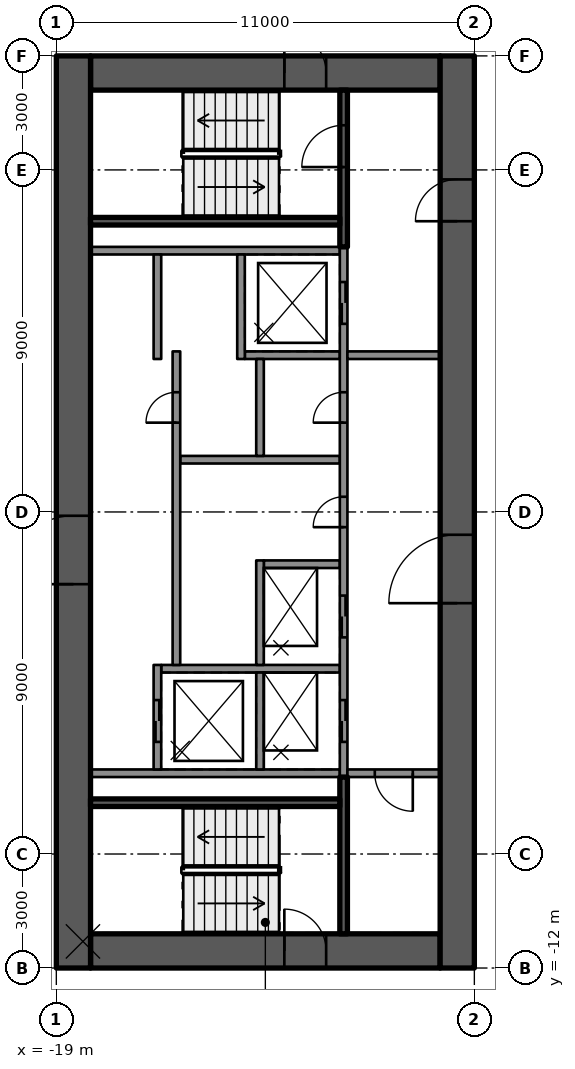
"""IFC4 building model, lengths in metres.
Left out: names, types, materials, properties, quantities, classifications, styles, units other than length and angle.
Written with IfcOpenShell. Run it as: python <this file> out.ifc"""

import sys

from ifc_helpers import new_model, si_unit, direction, frame, frame_2d, origin, place, context, subcontext, project, spatial, rectangle, extrude, element, fill, save


model = new_model("IFC4")
c1 = context("Model", 3, precision=1e-05, world=origin(), true_north=direction((0.0, 1.0)))
c2 = subcontext(c1, "Body", "Model", "MODEL_VIEW")
j1 = project(units=[si_unit("LENGTHUNIT", "METRE"), si_unit("PLANEANGLEUNIT", "RADIAN")], contexts=[c1])
p1 = place(None, origin())
s1 = spatial("IfcSite", under=j1, at=p1, CompositionType="ELEMENT")
p2 = place(p1, origin())
s2 = spatial("IfcBuilding", under=s1, at=p2, CompositionType="ELEMENT")
p3 = place(p2, frame((0.0, 0.0, 278.9)))
s3 = spatial("IfcBuildingStorey", under=s2, at=p3, CompositionType="ELEMENT", Elevation=278.9)
p4 = place(p3, frame((-18.1, 11.55, 0.0), z_axis=(0.0, 0.0, 1.0), x_axis=(1.0, 0.0, 0.0)))
e1 = element("IfcWall", 1, at=p4, inside=s3, PredefinedType="SHEAR", context=c2, shape_type="SweptSolid", body=[
    extrude(rectangle(XDim=9.2, YDim=0.9, at=frame_2d((4.6, 0.0))), origin(), (0.0, 0.0, 1.0), 3.5),
])
p5 = place(p4, frame((5.1, 0.0, 0.0)))
e2 = element("IfcOpeningElement", 2, at=p5, cuts=e1, PredefinedType="OPENING", context=c2, shape_type="SweptSolid", body=[
    extrude(rectangle(XDim=1.1, YDim=2.1, at=frame_2d((0.55, 1.05))), frame((0.0, 0.46, 0.0), z_axis=(0.0, -1.0, 0.0), x_axis=(1.0, 0.0, 0.0)), (0.0, 0.0, 1.0), 0.92),
])
p6 = place(p3, frame((-18.1, -11.55, 0.0), z_axis=(0.0, 0.0, 1.0), x_axis=(1.0, 0.0, 0.0)))
e3 = element("IfcWall", 3, at=p6, inside=s3, PredefinedType="SHEAR", context=c2, shape_type="SweptSolid", body=[
    extrude(rectangle(XDim=9.2, YDim=0.9, at=frame_2d((4.6, 0.0))), origin(), (0.0, 0.0, 1.0), 3.5),
])
p7 = place(p6, frame((5.1, 0.0, 0.0)))
e4 = element("IfcOpeningElement", 4, at=p7, cuts=e3, PredefinedType="OPENING", context=c2, shape_type="SweptSolid", body=[
    extrude(rectangle(XDim=1.1, YDim=2.1, at=frame_2d((0.55, 1.05))), frame((0.0, 0.46, 0.0), z_axis=(0.0, -1.0, 0.0), x_axis=(1.0, 0.0, 0.0)), (0.0, 0.0, 1.0), 0.92),
])
p8 = place(p3, frame((-18.55, -12.0, 0.0), z_axis=(0.0, 0.0, 1.0), x_axis=(0.0, 1.0, 0.0)))
e5 = element("IfcWall", 5, at=p8, inside=s3, PredefinedType="SHEAR", context=c2, shape_type="SweptSolid", body=[
    extrude(rectangle(XDim=24.0, YDim=0.9, at=frame_2d((12.0, 0.0))), origin(), (0.0, 0.0, 1.0), 3.5),
])
p9 = place(p8, frame((10.1, 0.0, 0.0)))
e6 = element("IfcOpeningElement", 6, at=p9, cuts=e5, PredefinedType="OPENING", context=c2, shape_type="SweptSolid", body=[
    extrude(rectangle(XDim=1.8, YDim=2.1, at=frame_2d((0.9, 1.05))), frame((0.0, 0.46, 0.0), z_axis=(0.0, -1.0, 0.0), x_axis=(1.0, 0.0, 0.0)), (0.0, 0.0, 1.0), 0.92),
])
p10 = place(p3, frame((-8.45, -12.0, 0.0), z_axis=(0.0, 0.0, 1.0), x_axis=(0.0, 1.0, 0.0)))
e7 = element("IfcWall", 7, at=p10, inside=s3, PredefinedType="SHEAR", context=c2, shape_type="SweptSolid", body=[
    extrude(rectangle(XDim=24.0, YDim=0.9, at=frame_2d((12.0, 0.0))), origin(), (0.0, 0.0, 1.0), 3.5),
])
p11 = place(p10, frame((9.6, 0.0, 0.0)))
e8 = element("IfcOpeningElement", 8, at=p11, cuts=e7, PredefinedType="OPENING", context=c2, shape_type="SweptSolid", body=[
    extrude(rectangle(XDim=1.8, YDim=2.1, at=frame_2d((0.9, 1.05))), frame((0.0, 0.46, 0.0), z_axis=(0.0, -1.0, 0.0), x_axis=(1.0, 0.0, 0.0)), (0.0, 0.0, 1.0), 0.92),
])
p12 = place(p10, frame((19.65, 0.0, 0.0)))
e9 = element("IfcOpeningElement", 9, at=p12, cuts=e7, PredefinedType="OPENING", context=c2, shape_type="SweptSolid", body=[
    extrude(rectangle(XDim=1.1, YDim=2.1, at=frame_2d((0.55, 1.05))), frame((0.0, 0.46, 0.0), z_axis=(0.0, -1.0, 0.0), x_axis=(1.0, 0.0, 0.0)), (0.0, 0.0, 1.0), 0.92),
])
for number, where, z_axis, x_axis in (
    (10, (-11.54, 6.875, 0.0), (0.0, 0.0, 1.0), (-1.0, 0.0, 0.0)),
    (11, (-11.54, -6.875, 0.0), (0.0, 0.0, 1.0), (-1.0, 0.0, 0.0)),
):
    element("IfcWall", number, at=place(p3, frame(where, z_axis=z_axis, x_axis=x_axis)), inside=s3, PredefinedType="SOLIDWALL", context=c2, shape_type="SweptSolid", body=[
        extrude(rectangle(XDim=6.56, YDim=0.2, at=frame_2d((3.28, 0.0))), origin(), (0.0, 0.0, 1.0), 3.09),
    ])
p13 = place(p3, frame((-11.54, -4.125, 0.0), z_axis=(0.0, 0.0, 1.0), x_axis=(-1.0, 0.0, 0.0)))
e12 = element("IfcWall", 12, at=p13, inside=s3, PredefinedType="SOLIDWALL", context=c2, shape_type="SweptSolid", body=[
    extrude(rectangle(XDim=4.7, YDim=0.2, at=frame_2d((2.35, 0.0))), origin(), (0.0, 0.0, 1.0), 3.09),
])
p14 = place(p3, frame((-11.54, -1.375, 0.0), z_axis=(0.0, 0.0, 1.0), x_axis=(-1.0, 0.0, 0.0)))
e13 = element("IfcWall", 13, at=p14, inside=s3, PredefinedType="SOLIDWALL", context=c2, shape_type="SweptSolid", body=[
    extrude(rectangle(XDim=2.0, YDim=0.2, at=frame_2d((1.0, 0.0))), origin(), (0.0, 0.0, 1.0), 3.09),
])
p15 = place(p3, frame((-11.54, 1.375, 0.0), z_axis=(0.0, 0.0, 1.0), x_axis=(-1.0, 0.0, 0.0)))
e14 = element("IfcWall", 14, at=p15, inside=s3, PredefinedType="SOLIDWALL", context=c2, shape_type="SweptSolid", body=[
    extrude(rectangle(XDim=4.2, YDim=0.2, at=frame_2d((2.1, 0.0))), origin(), (0.0, 0.0, 1.0), 3.09),
])
p16 = place(p3, frame((-11.54, 4.125, 0.0), z_axis=(0.0, 0.0, 1.0), x_axis=(-1.0, 0.0, 0.0)))
e15 = element("IfcWall", 15, at=p16, inside=s3, PredefinedType="SOLIDWALL", context=c2, shape_type="SweptSolid", body=[
    extrude(rectangle(XDim=2.5, YDim=0.2, at=frame_2d((1.25, 0.0))), origin(), (0.0, 0.0, 1.0), 3.09),
])
p17 = place(p3, frame((-11.44, -6.975, 0.0), z_axis=(0.0, 0.0, 1.0), x_axis=(0.0, 1.0, 0.0)))
e16 = element("IfcWall", 16, at=p17, inside=s3, PredefinedType="SOLIDWALL", context=c2, shape_type="SweptSolid", body=[
    extrude(rectangle(XDim=13.95, YDim=0.2, at=frame_2d((6.975, 0.0))), origin(), (0.0, 0.0, 1.0), 3.09),
])
p18 = place(p17, frame((0.925, 0.0, 0.0)))
e17 = element("IfcOpeningElement", 17, at=p18, cuts=e16, PredefinedType="OPENING", context=c2, shape_type="SweptSolid", body=[
    extrude(rectangle(XDim=1.1, YDim=2.1, at=frame_2d((0.55, 1.05))), frame((0.0, 0.11, 0.0), z_axis=(0.0, -1.0, 0.0), x_axis=(1.0, 0.0, 0.0)), (0.0, 0.0, 1.0), 0.22),
])
p19 = place(p17, frame((3.675, 0.0, 0.0)))
e18 = element("IfcOpeningElement", 18, at=p19, cuts=e16, PredefinedType="OPENING", context=c2, shape_type="SweptSolid", body=[
    extrude(rectangle(XDim=1.1, YDim=2.1, at=frame_2d((0.55, 1.05))), frame((0.0, 0.11, 0.0), z_axis=(0.0, -1.0, 0.0), x_axis=(1.0, 0.0, 0.0)), (0.0, 0.0, 1.0), 0.22),
])
p20 = place(p17, frame((11.925, 0.0, 0.0)))
e19 = element("IfcOpeningElement", 19, at=p20, cuts=e16, PredefinedType="OPENING", context=c2, shape_type="SweptSolid", body=[
    extrude(rectangle(XDim=1.1, YDim=2.1, at=frame_2d((0.55, 1.05))), frame((0.0, 0.11, 0.0), z_axis=(0.0, -1.0, 0.0), x_axis=(1.0, 0.0, 0.0)), (0.0, 0.0, 1.0), 0.22),
])
p21 = place(p17, frame((6.575, 0.0, 0.0)))
e20 = element("IfcOpeningElement", 20, at=p21, cuts=e16, PredefinedType="OPENING", context=c2, shape_type="SweptSolid", body=[
    extrude(rectangle(XDim=0.8, YDim=2.1, at=frame_2d((0.4, 1.05))), frame((0.0, 0.11, 0.0), z_axis=(0.0, -1.0, 0.0), x_axis=(1.0, 0.0, 0.0)), (0.0, 0.0, 1.0), 0.22),
])
p22 = place(p17, frame((9.325, 0.0, 0.0)))
e21 = element("IfcOpeningElement", 21, at=p22, cuts=e16, PredefinedType="OPENING", context=c2, shape_type="SweptSolid", body=[
    extrude(rectangle(XDim=0.8, YDim=2.1, at=frame_2d((0.4, 1.05))), frame((0.0, 0.11, 0.0), z_axis=(0.0, -1.0, 0.0), x_axis=(1.0, 0.0, 0.0)), (0.0, 0.0, 1.0), 0.22),
])
p23 = place(p3, frame((-13.64, -6.775, 0.0), z_axis=(0.0, 0.0, 1.0), x_axis=(0.0, 1.0, 0.0)))
e22 = element("IfcWall", 22, at=p23, inside=s3, PredefinedType="SOLIDWALL", context=c2, shape_type="SweptSolid", body=[
    extrude(rectangle(XDim=2.55, YDim=0.2, at=frame_2d((1.275, 0.0))), origin(), (0.0, 0.0, 1.0), 3.09),
])
p24 = place(p3, frame((-13.64, -4.025, 0.0), z_axis=(0.0, 0.0, 1.0), x_axis=(0.0, 1.0, 0.0)))
e23 = element("IfcWall", 23, at=p24, inside=s3, PredefinedType="SOLIDWALL", context=c2, shape_type="SweptSolid", body=[
    extrude(rectangle(XDim=2.75, YDim=0.2, at=frame_2d((1.375, 0.0))), origin(), (0.0, 0.0, 1.0), 3.09),
])
p25 = place(p3, frame((-13.64, 1.475, 0.0), z_axis=(0.0, 0.0, 1.0), x_axis=(0.0, 1.0, 0.0)))
e24 = element("IfcWall", 24, at=p25, inside=s3, PredefinedType="SOLIDWALL", context=c2, shape_type="SweptSolid", body=[
    extrude(rectangle(XDim=2.55, YDim=0.2, at=frame_2d((1.275, 0.0))), origin(), (0.0, 0.0, 1.0), 3.09),
])
p26 = place(p3, frame((-14.14, 4.025, 0.0), z_axis=(0.0, 0.0, 1.0), x_axis=(0.0, 1.0, 0.0)))
e25 = element("IfcWall", 25, at=p26, inside=s3, PredefinedType="SOLIDWALL", context=c2, shape_type="SweptSolid", body=[
    extrude(rectangle(XDim=2.75, YDim=0.2, at=frame_2d((1.375, 0.0))), origin(), (0.0, 0.0, 1.0), 3.09),
])
p27 = place(p3, frame((-16.34, -6.775, 0.0), z_axis=(0.0, 0.0, 1.0), x_axis=(0.0, 1.0, 0.0)))
e26 = element("IfcWall", 26, at=p27, inside=s3, PredefinedType="SOLIDWALL", context=c2, shape_type="SweptSolid", body=[
    extrude(rectangle(XDim=2.75, YDim=0.2, at=frame_2d((1.375, 0.0))), origin(), (0.0, 0.0, 1.0), 3.09),
])
p28 = place(p27, frame((0.725, 0.0, 0.0)))
e27 = element("IfcOpeningElement", 27, at=p28, cuts=e26, PredefinedType="OPENING", context=c2, shape_type="SweptSolid", body=[
    extrude(rectangle(XDim=1.1, YDim=2.1, at=frame_2d((0.55, 1.05))), frame((0.0, 0.11, 0.0), z_axis=(0.0, -1.0, 0.0), x_axis=(1.0, 0.0, 0.0)), (0.0, 0.0, 1.0), 0.22),
])
p29 = place(p3, frame((-15.84, -4.025, 0.0), z_axis=(0.0, 0.0, 1.0), x_axis=(0.0, 1.0, 0.0)))
e28 = element("IfcWall", 28, at=p29, inside=s3, PredefinedType="SOLIDWALL", context=c2, shape_type="SweptSolid", body=[
    extrude(rectangle(XDim=8.25, YDim=0.2, at=frame_2d((4.125, 0.0))), origin(), (0.0, 0.0, 1.0), 3.09),
])
p30 = place(p29, frame((6.375, 0.0, 0.0)))
e29 = element("IfcOpeningElement", 29, at=p30, cuts=e28, PredefinedType="OPENING", context=c2, shape_type="SweptSolid", body=[
    extrude(rectangle(XDim=0.8, YDim=2.1, at=frame_2d((0.4, 1.05))), frame((0.0, 0.11, 0.0), z_axis=(0.0, -1.0, 0.0), x_axis=(1.0, 0.0, 0.0)), (0.0, 0.0, 1.0), 0.22),
])
p31 = place(p3, frame((-16.34, 4.025, 0.0), z_axis=(0.0, 0.0, 1.0), x_axis=(0.0, 1.0, 0.0)))
e30 = element("IfcWall", 30, at=p31, inside=s3, PredefinedType="SOLIDWALL", context=c2, shape_type="SweptSolid", body=[
    extrude(rectangle(XDim=2.75, YDim=0.2, at=frame_2d((1.375, 0.0))), origin(), (0.0, 0.0, 1.0), 3.09),
])
p32 = place(p3, frame((-11.44, 6.975, 0.0), z_axis=(0.0, 0.0, 1.0), x_axis=(0.0, 1.0, 0.0)))
e31 = element("IfcWall", 31, at=p32, inside=s3, PredefinedType="SOLIDWALL", context=c2, shape_type="SweptSolid", body=[
    extrude(rectangle(XDim=4.125, YDim=0.2, at=frame_2d((2.062, 0.0))), origin(), (0.0, 0.0, 1.0), 3.09),
])
p33 = place(p32, frame((2.1, 0.0, 0.0)))
e32 = element("IfcOpeningElement", 32, at=p33, cuts=e31, PredefinedType="OPENING", context=c2, shape_type="SweptSolid", body=[
    extrude(rectangle(XDim=1.1, YDim=2.1, at=frame_2d((0.55, 1.05))), frame((0.0, 0.11, 0.0), z_axis=(0.0, -1.0, 0.0), x_axis=(1.0, 0.0, 0.0)), (0.0, 0.0, 1.0), 0.22),
])
p34 = place(p3, frame((-11.54, 7.65, 0.0), z_axis=(0.0, 0.0, 1.0), x_axis=(-1.0, 0.0, 0.0)))
e33 = element("IfcWall", 33, at=p34, inside=s3, PredefinedType="SOLIDWALL", context=c2, shape_type="SweptSolid", body=[
    extrude(rectangle(XDim=6.56, YDim=0.2, at=frame_2d((3.28, 0.0))), origin(), (0.0, 0.0, 1.0), 3.09),
])
p35 = place(p3, frame((-11.44, -11.1, 0.0), z_axis=(0.0, 0.0, 1.0), x_axis=(0.0, 1.0, 0.0)))
e34 = element("IfcWall", 34, at=p35, inside=s3, PredefinedType="SOLIDWALL", context=c2, shape_type="SweptSolid", body=[
    extrude(rectangle(XDim=4.125, YDim=0.2, at=frame_2d((2.062, 0.0))), origin(), (0.0, 0.0, 1.0), 3.09),
])
p36 = place(p3, frame((-11.54, -7.65, 0.0), z_axis=(0.0, 0.0, 1.0), x_axis=(-1.0, 0.0, 0.0)))
e35 = element("IfcWall", 35, at=p36, inside=s3, PredefinedType="SOLIDWALL", context=c2, shape_type="SweptSolid", body=[
    extrude(rectangle(XDim=6.56, YDim=0.2, at=frame_2d((3.28, 0.0))), origin(), (0.0, 0.0, 1.0), 3.09),
])
p37 = place(p3, frame((-8.9, 4.125, 0.0), z_axis=(0.0, 0.0, 1.0), x_axis=(-1.0, 0.0, 0.0)))
e36 = element("IfcWall", 36, at=p37, inside=s3, PredefinedType="PARTITIONING", context=c2, shape_type="SweptSolid", body=[
    extrude(rectangle(XDim=2.44, YDim=0.2, at=frame_2d((1.22, 0.0))), origin(), (0.0, 0.0, 1.0), 3.09),
])
p38 = place(p3, frame((-8.9, -6.875, 0.0), z_axis=(0.0, 0.0, 1.0), x_axis=(-1.0, 0.0, 0.0)))
e37 = element("IfcWall", 37, at=p38, inside=s3, PredefinedType="PARTITIONING", context=c2, shape_type="SweptSolid", body=[
    extrude(rectangle(XDim=2.44, YDim=0.2, at=frame_2d((1.22, 0.0))), origin(), (0.0, 0.0, 1.0), 3.09),
])
p39 = place(p38, frame((0.72, 0.0, 0.0)))
e38 = element("IfcOpeningElement", 38, at=p39, cuts=e37, PredefinedType="OPENING", context=c2, shape_type="SweptSolid", body=[
    extrude(rectangle(XDim=1.0, YDim=2.1, at=frame_2d((0.5, 1.05))), frame((0.0, 0.11, 0.0), z_axis=(0.0, -1.0, 0.0), x_axis=(1.0, 0.0, 0.0)), (0.0, 0.0, 1.0), 0.22),
])
p40 = place(p18, origin())
e39 = element("IfcDoor", 39, at=p40, inside=s3, OperationType="DOUBLE_DOOR_SLIDING", PredefinedType="DOOR", context=c2, shape_type="SweptSolid", body=[
    extrude(rectangle(XDim=1.1, YDim=2.1, at=frame_2d((0.55, 1.05))), frame((0.0, 0.025, 0.0), z_axis=(0.0, -1.0, 0.0), x_axis=(1.0, 0.0, 0.0)), (0.0, 0.0, 1.0), 0.05),
])
fill(e17, e39)
p41 = place(p28, origin())
e40 = element("IfcDoor", 40, at=p41, inside=s3, OperationType="DOUBLE_DOOR_SLIDING", PredefinedType="DOOR", context=c2, shape_type="SweptSolid", body=[
    extrude(rectangle(XDim=1.1, YDim=2.1, at=frame_2d((0.55, 1.05))), frame((0.0, 0.025, 0.0), z_axis=(0.0, -1.0, 0.0), x_axis=(1.0, 0.0, 0.0)), (0.0, 0.0, 1.0), 0.05),
])
fill(e27, e40)
p42 = place(p19, origin())
e41 = element("IfcDoor", 41, at=p42, inside=s3, OperationType="DOUBLE_DOOR_SLIDING", PredefinedType="DOOR", context=c2, shape_type="SweptSolid", body=[
    extrude(rectangle(XDim=1.1, YDim=2.1, at=frame_2d((0.55, 1.05))), frame((0.0, 0.025, 0.0), z_axis=(0.0, -1.0, 0.0), x_axis=(1.0, 0.0, 0.0)), (0.0, 0.0, 1.0), 0.05),
])
fill(e18, e41)
p43 = place(p20, origin())
e42 = element("IfcDoor", 42, at=p43, inside=s3, OperationType="DOUBLE_DOOR_SLIDING", PredefinedType="DOOR", context=c2, shape_type="SweptSolid", body=[
    extrude(rectangle(XDim=1.1, YDim=2.1, at=frame_2d((0.55, 1.05))), frame((0.0, 0.025, 0.0), z_axis=(0.0, -1.0, 0.0), x_axis=(1.0, 0.0, 0.0)), (0.0, 0.0, 1.0), 0.05),
])
fill(e19, e42)
p44 = place(p21, origin())
e43 = element("IfcDoor", 43, at=p44, inside=s3, OperationType="SINGLE_SWING_RIGHT", PredefinedType="DOOR", context=c2, shape_type="SweptSolid", body=[
    extrude(rectangle(XDim=0.8, YDim=2.1, at=frame_2d((0.4, 1.05))), frame((0.0, 0.025, 0.0), z_axis=(0.0, -1.0, 0.0), x_axis=(1.0, 0.0, 0.0)), (0.0, 0.0, 1.0), 0.05),
])
fill(e20, e43)
p45 = place(p22, origin())
e44 = element("IfcDoor", 44, at=p45, inside=s3, OperationType="SINGLE_SWING_LEFT", PredefinedType="DOOR", context=c2, shape_type="SweptSolid", body=[
    extrude(rectangle(XDim=0.8, YDim=2.1, at=frame_2d((0.4, 1.05))), frame((0.0, 0.025, 0.0), z_axis=(0.0, -1.0, 0.0), x_axis=(1.0, 0.0, 0.0)), (0.0, 0.0, 1.0), 0.05),
])
fill(e21, e44)
p46 = place(p30, origin())
e45 = element("IfcDoor", 45, at=p46, inside=s3, OperationType="SINGLE_SWING_LEFT", PredefinedType="DOOR", context=c2, shape_type="SweptSolid", body=[
    extrude(rectangle(XDim=0.8, YDim=2.1, at=frame_2d((0.4, 1.05))), frame((0.0, 0.025, 0.0), z_axis=(0.0, -1.0, 0.0), x_axis=(1.0, 0.0, 0.0)), (0.0, 0.0, 1.0), 0.05),
])
fill(e29, e45)
p47 = place(p11, origin())
e46 = element("IfcDoor", 46, at=p47, inside=s3, OperationType="SINGLE_SWING_LEFT", PredefinedType="DOOR", context=c2, shape_type="SweptSolid", body=[
    extrude(rectangle(XDim=1.8, YDim=2.1, at=frame_2d((0.9, 1.05))), frame((0.0, 0.025, 0.0), z_axis=(0.0, -1.0, 0.0), x_axis=(1.0, 0.0, 0.0)), (0.0, 0.0, 1.0), 0.05),
])
fill(e8, e46)
p48 = place(p9, origin())
e47 = element("IfcDoor", 47, at=p48, inside=s3, OperationType="SINGLE_SWING_LEFT", PredefinedType="DOOR", context=c2, shape_type="SweptSolid", body=[
    extrude(rectangle(XDim=1.8, YDim=2.1, at=frame_2d((0.9, 1.05))), frame((0.0, 0.025, 0.0), z_axis=(0.0, -1.0, 0.0), x_axis=(1.0, 0.0, 0.0)), (0.0, 0.0, 1.0), 0.05),
])
fill(e6, e47)
p49 = place(p12, origin())
e48 = element("IfcDoor", 48, at=p49, inside=s3, OperationType="SINGLE_SWING_RIGHT", PredefinedType="DOOR", context=c2, shape_type="SweptSolid", body=[
    extrude(rectangle(XDim=1.1, YDim=2.1, at=frame_2d((0.55, 1.05))), frame((0.0, 0.025, 0.0), z_axis=(0.0, -1.0, 0.0), x_axis=(1.0, 0.0, 0.0)), (0.0, 0.0, 1.0), 0.05),
])
fill(e9, e48)
p50 = place(p5, origin())
e49 = element("IfcDoor", 49, at=p50, inside=s3, OperationType="SINGLE_SWING_RIGHT", PredefinedType="DOOR", context=c2, shape_type="SweptSolid", body=[
    extrude(rectangle(XDim=1.1, YDim=2.1, at=frame_2d((0.55, 1.05))), frame((0.0, 0.025, 0.0), z_axis=(0.0, -1.0, 0.0), x_axis=(1.0, 0.0, 0.0)), (0.0, 0.0, 1.0), 0.05),
])
fill(e2, e49)
p51 = place(p7, origin())
e50 = element("IfcDoor", 50, at=p51, inside=s3, OperationType="SINGLE_SWING_RIGHT", PredefinedType="DOOR", context=c2, shape_type="SweptSolid", body=[
    extrude(rectangle(XDim=1.1, YDim=2.1, at=frame_2d((0.55, 1.05))), frame((0.0, 0.025, 0.0), z_axis=(0.0, -1.0, 0.0), x_axis=(1.0, 0.0, 0.0)), (0.0, 0.0, 1.0), 0.05),
])
fill(e4, e50)
p52 = place(p33, origin())
e51 = element("IfcDoor", 51, at=p52, inside=s3, OperationType="SINGLE_SWING_RIGHT", PredefinedType="DOOR", context=c2, shape_type="SweptSolid", body=[
    extrude(rectangle(XDim=1.1, YDim=2.1, at=frame_2d((0.55, 1.05))), frame((0.0, 0.025, 0.0), z_axis=(0.0, -1.0, 0.0), x_axis=(1.0, 0.0, 0.0)), (0.0, 0.0, 1.0), 0.05),
])
fill(e32, e51)
p53 = place(p39, origin())
e52 = element("IfcDoor", 52, at=p53, inside=s3, OperationType="SINGLE_SWING_RIGHT", PredefinedType="DOOR", context=c2, shape_type="SweptSolid", body=[
    extrude(rectangle(XDim=1.0, YDim=2.1, at=frame_2d((0.5, 1.05))), frame((0.0, 0.025, 0.0), z_axis=(0.0, -1.0, 0.0), x_axis=(1.0, 0.0, 0.0)), (0.0, 0.0, 1.0), 0.05),
])
fill(e38, e52)
save(model, sys.argv[1])
